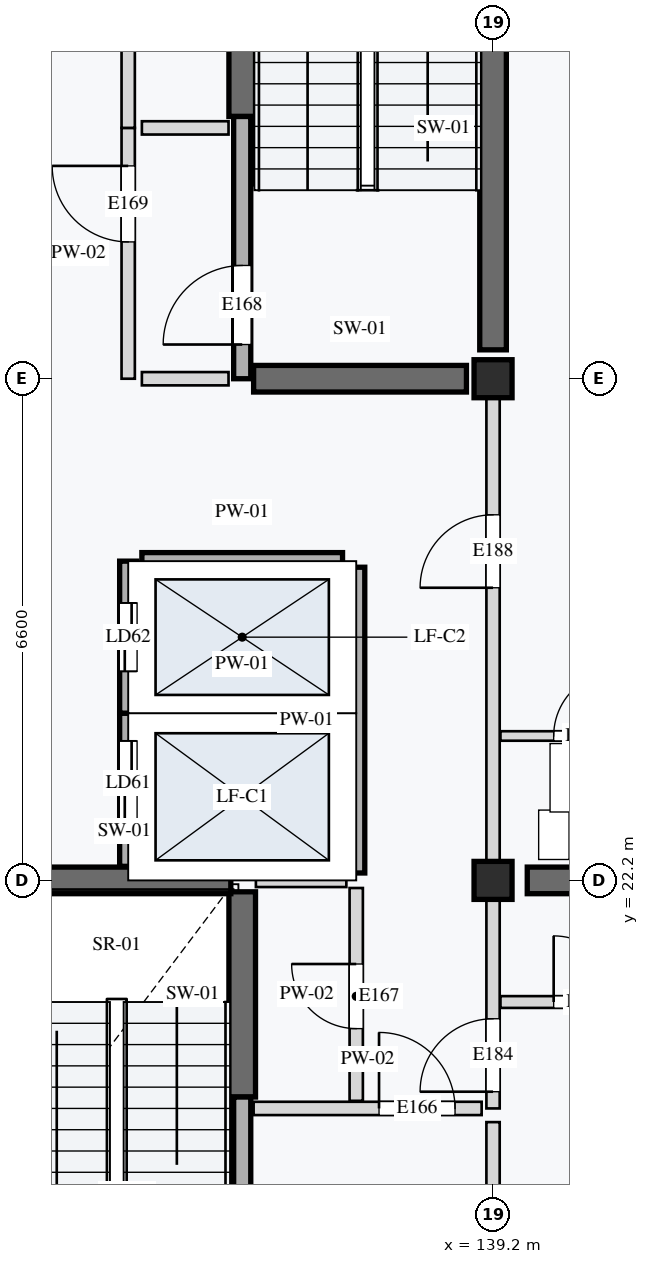
"""IFC4 building model, lengths in metres.
Left out: names, types, materials, properties, quantities, classifications, styles, units other than length and angle.
Written with IfcOpenShell. Run it as: python <this file> out.ifc"""

import sys

from ifc_helpers import new_model, si_unit, direction, frame, frame_2d, origin, origin_2d, place, context, subcontext, project, spatial, rectangle, extrude, element, fill, save


model = new_model("IFC4")
c1 = context("Model", 3, precision=1e-05, world=origin(), true_north=direction((0.0, 1.0)))
c2 = subcontext(c1, "Body", "Model", "MODEL_VIEW")
j1 = project(units=[si_unit("LENGTHUNIT", "METRE"), si_unit("PLANEANGLEUNIT", "RADIAN")], contexts=[c1])
p1 = place(None, origin())
s1 = spatial("IfcSite", under=j1, at=p1, CompositionType="ELEMENT")
p2 = place(p1, origin())
s2 = spatial("IfcBuilding", under=s1, at=p2, CompositionType="ELEMENT")
p3 = place(p2, frame((0.0, 0.0, 11.6)))
s3 = spatial("IfcBuildingStorey", under=s2, at=p3, CompositionType="ELEMENT", Elevation=11.6)
for number, where, z_axis, x_axis in (
    (1, (139.2, 22.2, 0.0), (0.0, 0.0, 1.0), (1.0, 0.0, 0.0)),
    (2, (139.2, 28.8, 0.0), (0.0, 0.0, 1.0), (1.0, 0.0, 0.0)),
):
    element("IfcColumn", number, at=place(p3, frame(where, z_axis=z_axis, x_axis=x_axis)), inside=s3, PredefinedType="COLUMN", context=c2, shape_type="SweptSolid", body=[
        extrude(rectangle(XDim=0.5, YDim=0.5, at=origin_2d()), origin(), (0.0, 0.0, 1.0), 3.2),
    ])
p4 = place(p3, frame((135.9, 19.35, 0.0), z_axis=(0.0, 0.0, 1.0), x_axis=(0.0, 1.0, 0.0)))
e3 = element("IfcWall", 3, at=p4, inside=s3, PredefinedType="SHEAR", context=c2, shape_type="SweptSolid", body=[
    extrude(rectangle(XDim=2.7, YDim=0.35, at=frame_2d((1.35, 0.0))), origin(), (0.0, 0.0, 1.0), 2.96),
])
p5 = place(p3, frame((132.95, 22.2, 0.0), z_axis=(0.0, 0.0, 1.0), x_axis=(1.0, 0.0, 0.0)))
e4 = element("IfcWall", 4, at=p5, inside=s3, PredefinedType="SHEAR", context=c2, shape_type="SweptSolid", body=[
    extrude(rectangle(XDim=2.8, YDim=0.35, at=frame_2d((1.4, 0.0))), origin(), (0.0, 0.0, 1.0), 2.96),
])
p6 = place(p3, frame((139.2, 29.18, 0.0), z_axis=(0.0, 0.0, 1.0), x_axis=(0.0, 1.0, 0.0)))
e5 = element("IfcWall", 5, at=p6, inside=s3, PredefinedType="SHEAR", context=c2, shape_type="SweptSolid", body=[
    extrude(rectangle(XDim=5.84, YDim=0.35, at=frame_2d((2.92, 0.0))), origin(), (0.0, 0.0, 1.0), 2.96),
])
for number, where, z_axis, x_axis in (
    (6, (135.9, 32.25, 0.0), (0.0, 0.0, 1.0), (0.0, 1.0, 0.0)),
    (7, (136.05, 28.8, 0.0), (0.0, 0.0, 1.0), (1.0, 0.0, 0.0)),
):
    element("IfcWall", number, at=place(p3, frame(where, z_axis=z_axis, x_axis=x_axis)), inside=s3, PredefinedType="SHEAR", context=c2, shape_type="SweptSolid", body=[
        extrude(rectangle(XDim=2.8, YDim=0.35, at=frame_2d((1.4, 0.0))), origin(), (0.0, 0.0, 1.0), 2.96),
    ])
p7 = place(p3, frame((139.65, 22.2, 0.0), z_axis=(0.0, 0.0, 1.0), x_axis=(1.0, 0.0, 0.0)))
e8 = element("IfcWall", 8, at=p7, inside=s3, PredefinedType="SHEAR", context=c2, shape_type="SweptSolid", body=[
    extrude(rectangle(XDim=5.7, YDim=0.35, at=frame_2d((2.85, 0.0))), origin(), (0.0, 0.0, 1.0), 2.96),
])
p8 = place(p3, frame((135.9, 15.75, 0.0), z_axis=(0.0, 0.0, 1.0), x_axis=(0.0, 1.0, 0.0)))
e9 = element("IfcWall", 9, at=p8, inside=s3, PredefinedType="STANDARD", context=c2, shape_type="SweptSolid", body=[
    extrude(rectangle(XDim=3.6, YDim=0.225, at=frame_2d((1.8, 0.0))), origin(), (0.0, 0.0, 1.0), 2.96),
])
p9 = place(p8, frame((0.45, 0.0, 0.0)))
e10 = element("IfcOpeningElement", 10, at=p9, cuts=e9, PredefinedType="OPENING", context=c2, shape_type="SweptSolid", body=[
    extrude(rectangle(XDim=1.0, YDim=2.1, at=frame_2d((0.5, 1.05))), frame((0.0, 0.123, 0.0), z_axis=(0.0, -1.0, 0.0), x_axis=(1.0, 0.0, 0.0)), (0.0, 0.0, 1.0), 0.245),
])
p10 = place(p3, frame((136.05, 19.2, 0.0), z_axis=(0.0, 0.0, 1.0), x_axis=(1.0, 0.0, 0.0)))
e11 = element("IfcWall", 11, at=p10, inside=s3, PredefinedType="PARTITIONING", context=c2, shape_type="SweptSolid", body=[
    extrude(rectangle(XDim=3.0, YDim=0.175, at=frame_2d((1.5, 0.0))), origin(), (0.0, 0.0, 1.0), 2.96),
])
p11 = place(p10, frame((1.65, 0.0, 0.0)))
e12 = element("IfcOpeningElement", 12, at=p11, cuts=e11, PredefinedType="OPENING", context=c2, shape_type="SweptSolid", body=[
    extrude(rectangle(XDim=1.0, YDim=2.16, at=frame_2d((0.5, 1.08))), frame((0.0, 0.097, 0.0), z_axis=(0.0, -1.0, 0.0), x_axis=(1.0, 0.0, 0.0)), (0.0, 0.0, 1.0), 0.195),
])
p12 = place(p3, frame((137.4, 19.3, 0.0), z_axis=(0.0, 0.0, 1.0), x_axis=(0.0, 1.0, 0.0)))
e13 = element("IfcWall", 13, at=p12, inside=s3, PredefinedType="PARTITIONING", context=c2, shape_type="SweptSolid", body=[
    extrude(rectangle(XDim=2.8, YDim=0.175, at=frame_2d((1.4, 0.0))), origin(), (0.0, 0.0, 1.0), 2.96),
])
p13 = place(p12, frame((0.95, 0.0, 0.0)))
e14 = element("IfcOpeningElement", 14, at=p13, cuts=e13, PredefinedType="OPENING", context=c2, shape_type="SweptSolid", body=[
    extrude(rectangle(XDim=0.85, YDim=2.0, at=frame_2d((0.425, 1.0))), frame((0.0, 0.097, 0.0), z_axis=(0.0, -1.0, 0.0), x_axis=(1.0, 0.0, 0.0)), (0.0, 0.0, 1.0), 0.195),
])
p14 = place(p3, frame((136.08, 22.2, 0.0), z_axis=(0.0, 0.0, 1.0), x_axis=(1.0, 0.0, 0.0)))
e15 = element("IfcWall", 15, at=p14, inside=s3, PredefinedType="PARTITIONING", context=c2, shape_type="SweptSolid", body=[
    extrude(rectangle(XDim=1.19, YDim=0.175, at=frame_2d((0.595, 0.0))), origin(), (0.0, 0.0, 1.0), 2.96),
])
p15 = place(p3, frame((134.4, 22.385, 0.0), z_axis=(0.0, 0.0, 1.0), x_axis=(0.0, 1.0, 0.0)))
e16 = element("IfcWall", 16, at=p15, inside=s3, PredefinedType="STANDARD", context=c2, shape_type="SweptSolid", body=[
    extrude(rectangle(XDim=2.015, YDim=0.225, at=frame_2d((1.007, 0.0))), origin(), (0.0, 0.0, 1.0), 2.96),
])
p16 = place(p15, frame((0.55, 0.0, 0.0)))
e17 = element("IfcOpeningElement", 17, at=p16, cuts=e16, PredefinedType="OPENING", context=c2, shape_type="SweptSolid", body=[
    extrude(rectangle(XDim=1.1, YDim=2.1, at=frame_2d((0.55, 1.05))), frame((0.0, 0.123, 0.0), z_axis=(0.0, -1.0, 0.0), x_axis=(1.0, 0.0, 0.0)), (0.0, 0.0, 1.0), 0.245),
])
p17 = place(p3, frame((134.4, 24.4, 0.0), z_axis=(0.0, 0.0, 1.0), x_axis=(0.0, 1.0, 0.0)))
e18 = element("IfcWall", 18, at=p17, inside=s3, PredefinedType="STANDARD", context=c2, shape_type="SweptSolid", body=[
    extrude(rectangle(XDim=2.0, YDim=0.225, at=frame_2d((1.0, 0.0))), origin(), (0.0, 0.0, 1.0), 2.96),
])
p18 = place(p17, frame((0.55, 0.0, 0.0)))
e19 = element("IfcOpeningElement", 19, at=p18, cuts=e18, PredefinedType="OPENING", context=c2, shape_type="SweptSolid", body=[
    extrude(rectangle(XDim=0.9, YDim=2.1, at=frame_2d((0.45, 1.05))), frame((0.0, 0.123, 0.0), z_axis=(0.0, -1.0, 0.0), x_axis=(1.0, 0.0, 0.0)), (0.0, 0.0, 1.0), 0.245),
])
p19 = place(p3, frame((137.4, 22.298, 0.0), z_axis=(0.0, 0.0, 1.0), x_axis=(0.0, 1.0, 0.0)))
e20 = element("IfcWall", 20, at=p19, inside=s3, PredefinedType="STANDARD", context=c2, shape_type="SweptSolid", body=[
    extrude(rectangle(XDim=4.022, YDim=0.225, at=frame_2d((2.011, 0.0))), origin(), (0.0, 0.0, 1.0), 2.96),
])
for number, where, z_axis, x_axis in (
    (21, (134.58, 24.4, 0.0), (0.0, 0.0, 1.0), (1.0, 0.0, 0.0)),
    (22, (134.58, 26.4, 0.0), (0.0, 0.0, 1.0), (1.0, 0.0, 0.0)),
):
    element("IfcWall", number, at=place(p3, frame(where, z_axis=z_axis, x_axis=x_axis)), inside=s3, PredefinedType="STANDARD", context=c2, shape_type="SweptSolid", body=[
        extrude(rectangle(XDim=2.64, YDim=0.225, at=frame_2d((1.32, 0.0))), origin(), (0.0, 0.0, 1.0), 2.96),
    ])
p20 = place(p3, frame((135.9, 28.8, 0.0), z_axis=(0.0, 0.0, 1.0), x_axis=(0.0, 1.0, 0.0)))
e23 = element("IfcWall", 23, at=p20, inside=s3, PredefinedType="STANDARD", context=c2, shape_type="SweptSolid", body=[
    extrude(rectangle(XDim=3.45, YDim=0.225, at=frame_2d((1.725, 0.0))), origin(), (0.0, 0.0, 1.0), 2.96),
])
p21 = place(p20, frame((0.45, 0.0, 0.0)))
e24 = element("IfcOpeningElement", 24, at=p21, cuts=e23, PredefinedType="OPENING", context=c2, shape_type="SweptSolid", body=[
    extrude(rectangle(XDim=1.04, YDim=2.12, at=frame_2d((0.52, 1.06))), frame((0.0, 0.123, 0.0), z_axis=(0.0, -1.0, 0.0), x_axis=(1.0, 0.0, 0.0)), (0.0, 0.0, 1.0), 0.245),
])
p22 = place(p3, frame((134.4, 28.8, 0.0), z_axis=(0.0, 0.0, 1.0), x_axis=(0.0, 1.0, 0.0)))
e25 = element("IfcWall", 25, at=p22, inside=s3, PredefinedType="PARTITIONING", context=c2, shape_type="SweptSolid", body=[
    extrude(rectangle(XDim=3.3, YDim=0.175, at=frame_2d((1.65, 0.0))), origin(), (0.0, 0.0, 1.0), 2.96),
])
p23 = place(p22, frame((1.8, 0.0, 0.0)))
e26 = element("IfcOpeningElement", 26, at=p23, cuts=e25, PredefinedType="OPENING", context=c2, shape_type="SweptSolid", body=[
    extrude(rectangle(XDim=1.0, YDim=2.1, at=frame_2d((0.5, 1.05))), frame((0.0, 0.097, 0.0), z_axis=(0.0, -1.0, 0.0), x_axis=(1.0, 0.0, 0.0)), (0.0, 0.0, 1.0), 0.195),
])
p24 = place(p3, frame((134.4, 32.1, 0.0), z_axis=(0.0, 0.0, 1.0), x_axis=(0.0, 1.0, 0.0)))
e27 = element("IfcWall", 27, at=p24, inside=s3, PredefinedType="PARTITIONING", context=c2, shape_type="SweptSolid", body=[
    extrude(rectangle(XDim=3.3, YDim=0.175, at=frame_2d((1.65, 0.0))), origin(), (0.0, 0.0, 1.0), 2.96),
])
p25 = place(p24, frame((1.1, 0.0, 0.0)))
e28 = element("IfcOpeningElement", 28, at=p25, cuts=e27, PredefinedType="OPENING", context=c2, shape_type="SweptSolid", body=[
    extrude(rectangle(XDim=0.85, YDim=2.0, at=frame_2d((0.425, 1.0))), frame((0.0, 0.097, 0.0), z_axis=(0.0, -1.0, 0.0), x_axis=(1.0, 0.0, 0.0)), (0.0, 0.0, 1.0), 0.195),
])
for number, where, z_axis, x_axis in (
    (29, (134.58, 28.8, 0.0), (0.0, 0.0, 1.0), (1.0, 0.0, 0.0)),
    (30, (134.58, 32.1, 0.0), (0.0, 0.0, 1.0), (1.0, 0.0, 0.0)),
):
    element("IfcWall", number, at=place(p3, frame(where, z_axis=z_axis, x_axis=x_axis)), inside=s3, PredefinedType="PARTITIONING", context=c2, shape_type="SweptSolid", body=[
        extrude(rectangle(XDim=1.14, YDim=0.175, at=frame_2d((0.57, 0.0))), origin(), (0.0, 0.0, 1.0), 2.96),
    ])
p26 = place(p3, frame((139.2, 15.88, 0.0), z_axis=(0.0, 0.0, 1.0), x_axis=(0.0, 1.0, 0.0)))
e31 = element("IfcWall", 31, at=p26, inside=s3, PredefinedType="PARTITIONING", context=c2, shape_type="SweptSolid", body=[
    extrude(rectangle(XDim=3.14, YDim=0.175, at=frame_2d((1.57, 0.0))), origin(), (0.0, 0.0, 1.0), 2.55),
])
p27 = place(p3, frame((139.2, 19.2, 0.0), z_axis=(0.0, 0.0, 1.0), x_axis=(0.0, 1.0, 0.0)))
e32 = element("IfcWall", 32, at=p27, inside=s3, PredefinedType="PARTITIONING", context=c2, shape_type="SweptSolid", body=[
    extrude(rectangle(XDim=3.0, YDim=0.175, at=frame_2d((1.5, 0.0))), origin(), (0.0, 0.0, 1.0), 2.55),
])
p28 = place(p27, frame((0.22, 0.0, 0.0)))
e33 = element("IfcOpeningElement", 33, at=p28, cuts=e32, PredefinedType="OPENING", context=c2, shape_type="SweptSolid", body=[
    extrude(rectangle(XDim=0.96, YDim=2.18, at=frame_2d((0.48, 1.09))), frame((0.0, 0.097, 0.0), z_axis=(0.0, -1.0, 0.0), x_axis=(1.0, 0.0, 0.0)), (0.0, 0.0, 1.0), 0.195),
])
p29 = place(p3, frame((139.298, 20.6, 0.0), z_axis=(0.0, 0.0, 1.0), x_axis=(1.0, 0.0, 0.0)))
e34 = element("IfcWall", 34, at=p29, inside=s3, PredefinedType="PARTITIONING", context=c2, shape_type="SweptSolid", body=[
    extrude(rectangle(XDim=2.302, YDim=0.155, at=frame_2d((1.151, 0.0))), origin(), (0.0, 0.0, 1.0), 2.96),
])
p30 = place(p29, frame((0.7, 0.0, 0.0)))
e35 = element("IfcOpeningElement", 35, at=p30, cuts=e34, PredefinedType="OPENING", context=c2, shape_type="SweptSolid", body=[
    extrude(rectangle(XDim=0.87, YDim=2.08, at=frame_2d((0.435, 1.04))), frame((0.0, 0.087, 0.0), z_axis=(0.0, -1.0, 0.0), x_axis=(1.0, 0.0, 0.0)), (0.0, 0.0, 1.0), 0.175),
])
p31 = place(p3, frame((139.2, 22.2, 0.0), z_axis=(0.0, 0.0, 1.0), x_axis=(0.0, 1.0, 0.0)))
e36 = element("IfcWall", 36, at=p31, inside=s3, PredefinedType="PARTITIONING", context=c2, shape_type="SweptSolid", body=[
    extrude(rectangle(XDim=6.6, YDim=0.175, at=frame_2d((3.3, 0.0))), origin(), (0.0, 0.0, 1.0), 2.55),
])
p32 = place(p31, frame((3.85, 0.0, 0.0)))
e37 = element("IfcOpeningElement", 37, at=p32, cuts=e36, PredefinedType="OPENING", context=c2, shape_type="SweptSolid", body=[
    extrude(rectangle(XDim=0.96, YDim=2.18, at=frame_2d((0.48, 1.09))), frame((0.0, 0.097, 0.0), z_axis=(0.0, -1.0, 0.0), x_axis=(1.0, 0.0, 0.0)), (0.0, 0.0, 1.0), 0.195),
])
p33 = place(p3, frame((139.298, 24.1, 0.0), z_axis=(0.0, 0.0, 1.0), x_axis=(1.0, 0.0, 0.0)))
e38 = element("IfcWall", 38, at=p33, inside=s3, PredefinedType="PARTITIONING", context=c2, shape_type="SweptSolid", body=[
    extrude(rectangle(XDim=2.302, YDim=0.125, at=frame_2d((1.151, 0.0))), origin(), (0.0, 0.0, 1.0), 2.96),
])
p34 = place(p33, frame((0.7, 0.0, 0.0)))
e39 = element("IfcOpeningElement", 39, at=p34, cuts=e38, PredefinedType="OPENING", context=c2, shape_type="SweptSolid", body=[
    extrude(rectangle(XDim=0.85, YDim=2.04, at=frame_2d((0.425, 1.02))), frame((0.0, 0.073, 0.0), z_axis=(0.0, -1.0, 0.0), x_axis=(1.0, 0.0, 0.0)), (0.0, 0.0, 1.0), 0.145),
])
p35 = place(p11, origin())
e40 = element("IfcDoor", 40, at=p35, inside=s3, OperationType="SINGLE_SWING_LEFT", PredefinedType="DOOR", context=c2, shape_type="SweptSolid", body=[
    extrude(rectangle(XDim=1.0, YDim=2.16, at=frame_2d((0.5, 1.08))), frame((0.0, 0.025, 0.0), z_axis=(0.0, -1.0, 0.0), x_axis=(1.0, 0.0, 0.0)), (0.0, 0.0, 1.0), 0.05),
])
fill(e12, e40)
p36 = place(p13, origin())
e41 = element("IfcDoor", 41, at=p36, inside=s3, OperationType="SINGLE_SWING_RIGHT", PredefinedType="DOOR", context=c2, shape_type="SweptSolid", body=[
    extrude(rectangle(XDim=0.85, YDim=2.0, at=frame_2d((0.425, 1.0))), frame((0.0, 0.025, 0.0), z_axis=(0.0, -1.0, 0.0), x_axis=(1.0, 0.0, 0.0)), (0.0, 0.0, 1.0), 0.05),
])
fill(e14, e41)
p37 = place(p16, origin())
e42 = element("IfcDoor", 42, at=p37, inside=s3, OperationType="DOUBLE_DOOR_SLIDING", PredefinedType="DOOR", context=c2, shape_type="SweptSolid", body=[
    extrude(rectangle(XDim=1.1, YDim=2.1, at=frame_2d((0.55, 1.05))), frame((0.0, 0.025, 0.0), z_axis=(0.0, -1.0, 0.0), x_axis=(1.0, 0.0, 0.0)), (0.0, 0.0, 1.0), 0.05),
])
fill(e17, e42)
p38 = place(p18, origin())
e43 = element("IfcDoor", 43, at=p38, inside=s3, OperationType="DOUBLE_DOOR_SLIDING", PredefinedType="DOOR", context=c2, shape_type="SweptSolid", body=[
    extrude(rectangle(XDim=0.9, YDim=2.1, at=frame_2d((0.45, 1.05))), frame((0.0, 0.025, 0.0), z_axis=(0.0, -1.0, 0.0), x_axis=(1.0, 0.0, 0.0)), (0.0, 0.0, 1.0), 0.05),
])
fill(e19, e43)
p39 = place(p21, origin())
e44 = element("IfcDoor", 44, at=p39, inside=s3, OperationType="SINGLE_SWING_LEFT", PredefinedType="DOOR", context=c2, shape_type="SweptSolid", body=[
    extrude(rectangle(XDim=1.04, YDim=2.12, at=frame_2d((0.52, 1.06))), frame((0.0, 0.025, 0.0), z_axis=(0.0, -1.0, 0.0), x_axis=(1.0, 0.0, 0.0)), (0.0, 0.0, 1.0), 0.05),
])
fill(e24, e44)
p40 = place(p23, origin())
e45 = element("IfcDoor", 45, at=p40, inside=s3, OperationType="SINGLE_SWING_RIGHT", PredefinedType="DOOR", context=c2, shape_type="SweptSolid", body=[
    extrude(rectangle(XDim=1.0, YDim=2.1, at=frame_2d((0.5, 1.05))), frame((0.0, 0.025, 0.0), z_axis=(0.0, -1.0, 0.0), x_axis=(1.0, 0.0, 0.0)), (0.0, 0.0, 1.0), 0.05),
])
fill(e26, e45)
p41 = place(p28, origin())
e46 = element("IfcDoor", 46, at=p41, inside=s3, OperationType="SINGLE_SWING_LEFT", PredefinedType="DOOR", context=c2, shape_type="SweptSolid", body=[
    extrude(rectangle(XDim=0.96, YDim=2.18, at=frame_2d((0.48, 1.09))), frame((0.0, 0.025, 0.0), z_axis=(0.0, -1.0, 0.0), x_axis=(1.0, 0.0, 0.0)), (0.0, 0.0, 1.0), 0.05),
])
fill(e33, e46)
p42 = place(p30, origin())
e47 = element("IfcDoor", 47, at=p42, inside=s3, OperationType="SINGLE_SWING_LEFT", PredefinedType="DOOR", context=c2, shape_type="SweptSolid", body=[
    extrude(rectangle(XDim=0.87, YDim=2.08, at=frame_2d((0.435, 1.04))), frame((0.0, 0.025, 0.0), z_axis=(0.0, -1.0, 0.0), x_axis=(1.0, 0.0, 0.0)), (0.0, 0.0, 1.0), 0.05),
])
fill(e35, e47)
p43 = place(p32, origin())
e48 = element("IfcDoor", 48, at=p43, inside=s3, OperationType="SINGLE_SWING_LEFT", PredefinedType="DOOR", context=c2, shape_type="SweptSolid", body=[
    extrude(rectangle(XDim=0.96, YDim=2.18, at=frame_2d((0.48, 1.09))), frame((0.0, 0.025, 0.0), z_axis=(0.0, -1.0, 0.0), x_axis=(1.0, 0.0, 0.0)), (0.0, 0.0, 1.0), 0.05),
])
fill(e37, e48)
p44 = place(p34, origin())
e49 = element("IfcDoor", 49, at=p44, inside=s3, OperationType="SINGLE_SWING_RIGHT", PredefinedType="DOOR", context=c2, shape_type="SweptSolid", body=[
    extrude(rectangle(XDim=0.85, YDim=2.04, at=frame_2d((0.425, 1.02))), frame((0.0, 0.025, 0.0), z_axis=(0.0, -1.0, 0.0), x_axis=(1.0, 0.0, 0.0)), (0.0, 0.0, 1.0), 0.05),
])
fill(e39, e49)
save(model, sys.argv[1])
